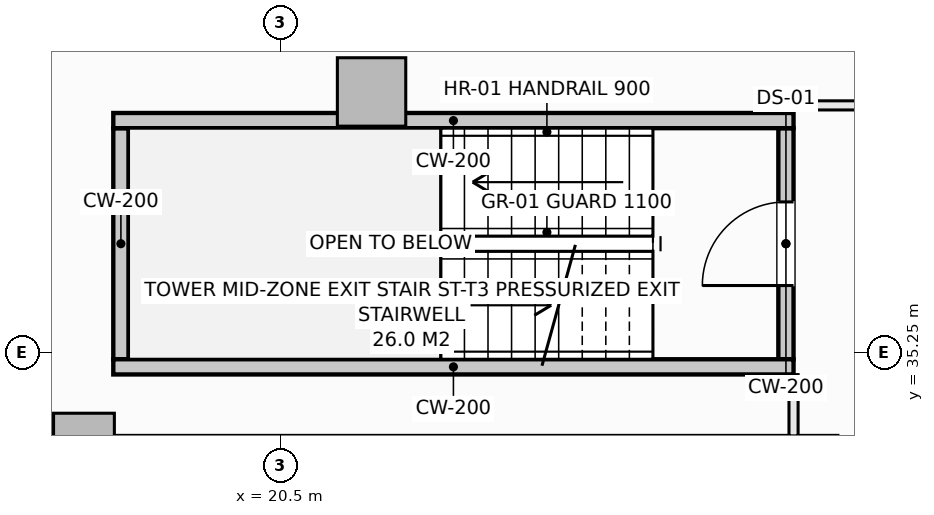
"""IFC4 building model, lengths in metres.
Left out: names, types, materials, properties, quantities, classifications, styles, units other than length and angle.
Written with IfcOpenShell. Run it as: python <this file> out.ifc"""

import sys

from ifc_helpers import new_model, si_unit, direction, frame, frame_2d, origin, origin_2d, place, context, subcontext, project, spatial, rectangle, extrude, element, fill, save


model = new_model("IFC4")
c1 = context("Model", 3, precision=1e-05, world=origin(), true_north=direction((0.0, 1.0)))
c2 = subcontext(c1, "Body", "Model", "MODEL_VIEW")
j1 = project(units=[si_unit("LENGTHUNIT", "METRE"), si_unit("PLANEANGLEUNIT", "RADIAN")], contexts=[c1])
p1 = place(None, origin())
s1 = spatial("IfcSite", under=j1, at=p1, CompositionType="ELEMENT")
p2 = place(p1, origin())
s2 = spatial("IfcBuilding", under=s1, at=p2, CompositionType="ELEMENT")
p3 = place(p2, frame((0.0, 0.0, 139.3)))
s3 = spatial("IfcBuildingStorey", under=s2, at=p3, CompositionType="ELEMENT", Elevation=139.3)
p4 = place(p3, frame((21.698, 38.677, -0.27), z_axis=(0.0, 0.0, 1.0), x_axis=(1.0, 0.0, 0.0)))
e1 = element("IfcColumn", 1, at=p4, inside=s3, PredefinedType="COLUMN", context=c2, shape_type="SweptSolid", body=[
    extrude(rectangle(XDim=0.9, YDim=0.9, at=origin_2d()), origin(), (0.0, 0.0, 1.0), 3.4),
])
p5 = place(p3, frame((17.914, 34.05, -0.27), z_axis=(0.0, 0.0, 1.0), x_axis=(1.0, 0.0, 0.0)))
e2 = element("IfcColumn", 2, at=p5, inside=s3, PredefinedType="PILASTER", context=c2, shape_type="SweptSolid", body=[
    extrude(rectangle(XDim=0.8, YDim=0.8, at=origin_2d()), origin(), (0.0, 0.0, 1.0), 3.4),
])
p6 = place(p3, frame((14.481, 39.223, 0.0), z_axis=(0.0, 0.0, 1.0), x_axis=(0.616435134162, 0.787405693001, 0.0)))
e3 = element("IfcWall", 3, at=p6, inside=s3, PredefinedType="SOLIDWALL", context=c2, shape_type="SweptSolid", body=[
    extrude(rectangle(XDim=5.759, YDim=0.3, at=frame_2d((2.879, 0.0))), origin(), (0.0, 0.0, 1.0), 2.653),
])
p7 = place(p6, frame((1.92, 0.0, 0.74)))
e4 = element("IfcOpeningElement", 4, at=p7, cuts=e3, PredefinedType="OPENING", context=c2, shape_type="SweptSolid", body=[
    extrude(rectangle(XDim=2.1, YDim=1.7, at=frame_2d((1.05, 0.85))), frame((0.0, 0.16, 0.0), z_axis=(0.0, -1.0, 0.0), x_axis=(1.0, 0.0, 0.0)), (0.0, 0.0, 1.0), 0.32),
])
p8 = place(p3, frame((27.15, 35.16, -0.27), z_axis=(0.0, 0.0, 1.0), x_axis=(0.0, 1.0, 0.0)))
e5 = element("IfcWall", 5, at=p8, inside=s3, PredefinedType="SHEAR", context=c2, shape_type="SweptSolid", body=[
    extrude(rectangle(XDim=3.04, YDim=0.2, at=frame_2d((1.52, 0.0))), origin(), (0.0, 0.0, 1.0), 3.4),
])
p9 = place(p8, frame((0.97, 0.0, 0.27)))
e6 = element("IfcOpeningElement", 6, at=p9, cuts=e5, PredefinedType="OPENING", context=c2, shape_type="SweptSolid", body=[
    extrude(rectangle(XDim=1.1, YDim=2.15, at=frame_2d((0.55, 1.075))), frame((0.0, 0.11, 0.0), z_axis=(0.0, -1.0, 0.0), x_axis=(1.0, 0.0, 0.0)), (0.0, 0.0, 1.0), 0.22),
])
p10 = place(p3, frame((18.4, 35.16, -0.27), z_axis=(0.0, 0.0, 1.0), x_axis=(0.0, 1.0, 0.0)))
e7 = element("IfcWall", 7, at=p10, inside=s3, PredefinedType="SHEAR", context=c2, shape_type="SweptSolid", body=[
    extrude(rectangle(XDim=3.04, YDim=0.2, at=frame_2d((1.52, 0.0))), origin(), (0.0, 0.0, 1.0), 3.4),
])
for number, where, z_axis, x_axis in (
    (8, (18.3, 38.3, -0.27), (0.0, 0.0, 1.0), (1.0, 0.0, 0.0)),
    (9, (18.3, 35.06, -0.27), (0.0, 0.0, 1.0), (1.0, 0.0, 0.0)),
):
    element("IfcWall", number, at=place(p3, frame(where, z_axis=z_axis, x_axis=x_axis)), inside=s3, PredefinedType="SHEAR", context=c2, shape_type="SweptSolid", body=[
        extrude(rectangle(XDim=8.95, YDim=0.2, at=frame_2d((4.475, 0.0))), origin(), (0.0, 0.0, 1.0), 3.4),
    ])
p11 = place(p3, frame((27.25, 34.152, 0.0), z_axis=(0.0, 0.0, 1.0), x_axis=(0.0, 1.0, 0.0)))
e10 = element("IfcWall", 10, at=p11, inside=s3, PredefinedType="PARTITIONING", context=c2, shape_type="SweptSolid", body=[
    extrude(rectangle(XDim=0.806, YDim=0.12, at=frame_2d((0.403, 0.0))), origin(), (0.0, 0.0, 1.0), 3.13),
])
p12 = place(p3, frame((27.25, 38.5, 0.0), z_axis=(0.0, 0.0, 1.0), x_axis=(1.0, 0.0, 0.0)))
e11 = element("IfcWall", 11, at=p12, inside=s3, PredefinedType="PARTITIONING", context=c2, shape_type="SweptSolid", body=[
    extrude(rectangle(XDim=2.53, YDim=0.12, at=frame_2d((1.265, 0.0))), origin(), (0.0, 0.0, 1.0), 3.13),
])
p13 = place(p9, origin())
e12 = element("IfcDoor", 12, at=p13, inside=s3, OperationType="SINGLE_SWING_LEFT", PredefinedType="DOOR", context=c2, shape_type="SweptSolid", body=[
    extrude(rectangle(XDim=1.1, YDim=2.15, at=frame_2d((0.55, 1.075))), frame((0.0, 0.025, 0.0), z_axis=(0.0, -1.0, 0.0), x_axis=(1.0, 0.0, 0.0)), (0.0, 0.0, 1.0), 0.05),
])
fill(e6, e12)
save(model, sys.argv[1])
